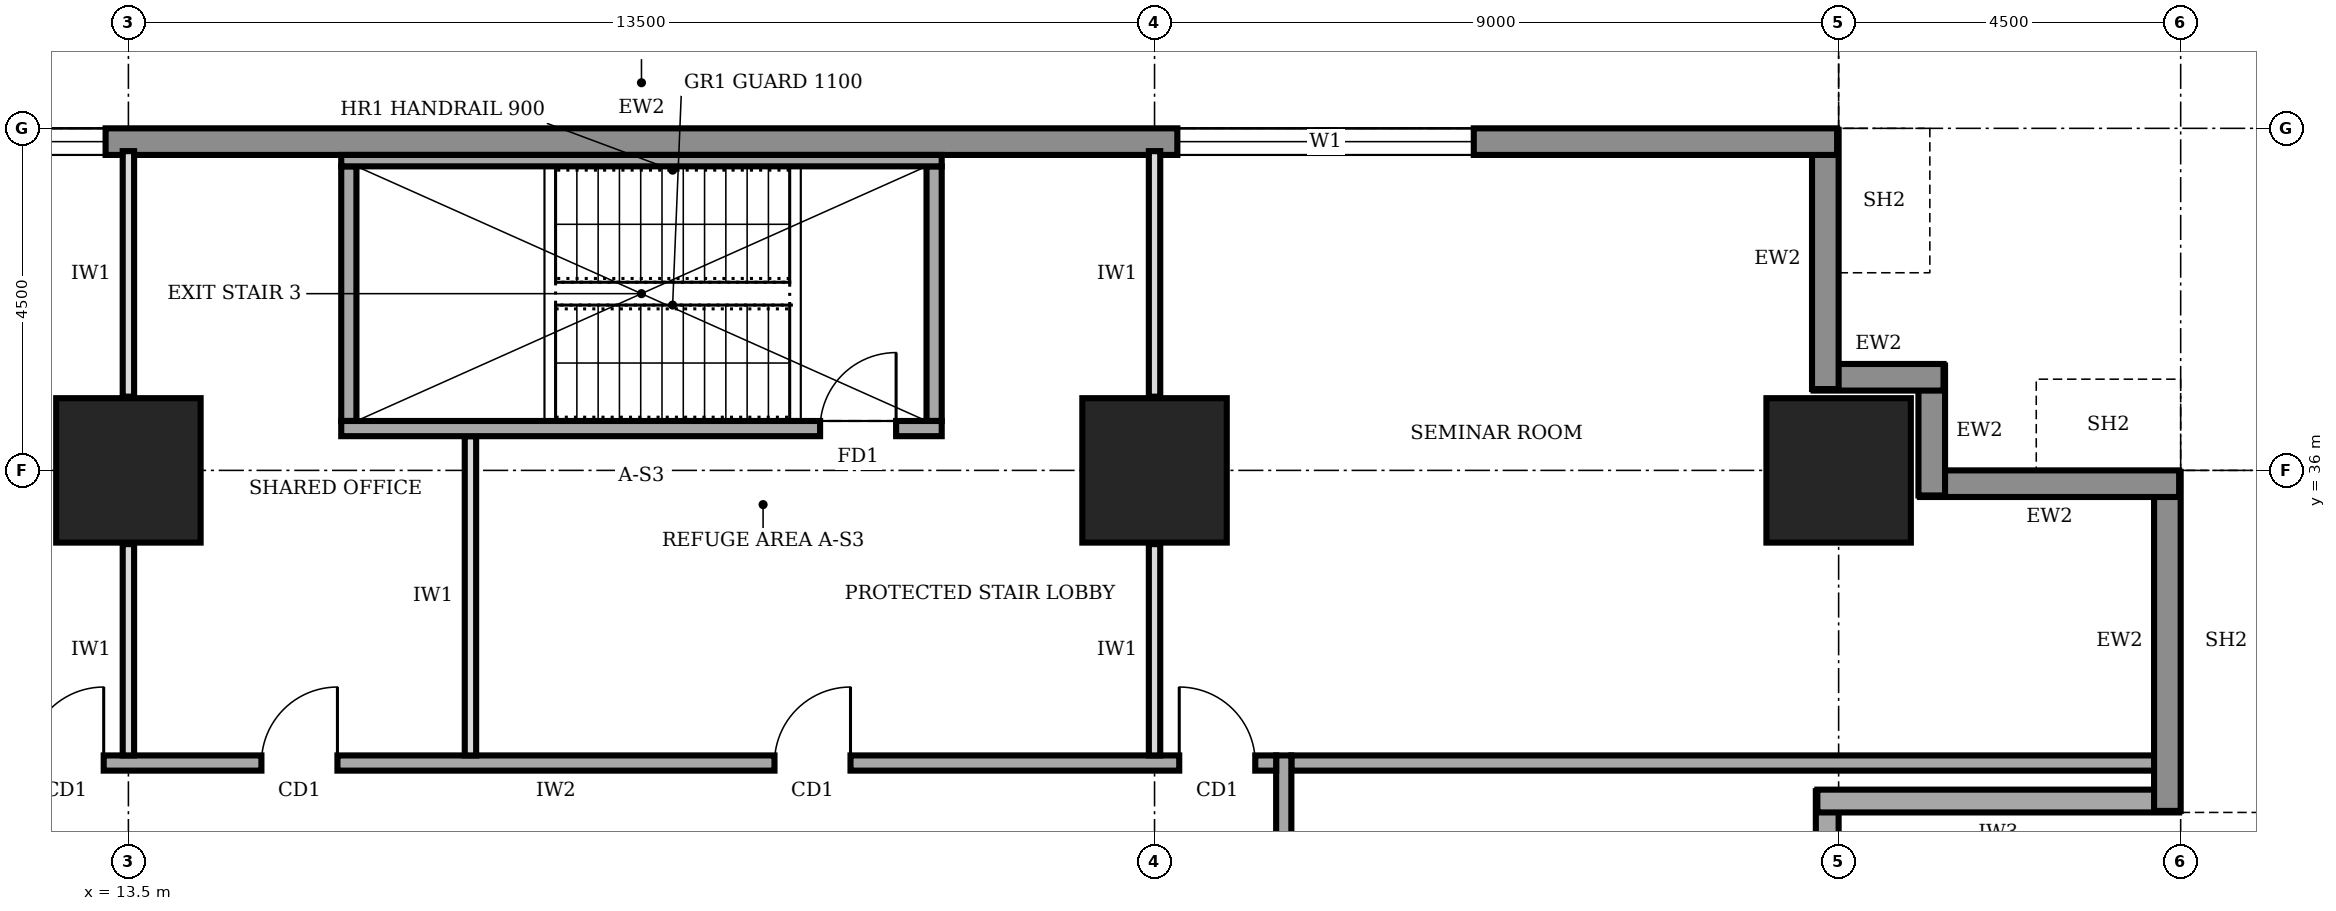
"""IFC4 building model, lengths in metres.
Left out: names, types, materials, properties, quantities, classifications, styles, units other than length and angle.
Written with IfcOpenShell. Run it as: python <this file> out.ifc"""

import sys

from ifc_helpers import new_model, si_unit, direction, frame, frame_2d, origin, origin_2d, place, context, subcontext, project, spatial, rectangle, extrude, element, fill, save


model = new_model("IFC4")
c1 = context("Model", 3, precision=1e-05, world=origin(), true_north=direction((0.0, 1.0)))
c2 = subcontext(c1, "Body", "Model", "MODEL_VIEW")
j1 = project(units=[si_unit("LENGTHUNIT", "METRE"), si_unit("PLANEANGLEUNIT", "RADIAN")], contexts=[c1])
p1 = place(None, origin())
s1 = spatial("IfcSite", under=j1, at=p1, CompositionType="ELEMENT")
p2 = place(p1, origin())
s2 = spatial("IfcBuilding", under=s1, at=p2, CompositionType="ELEMENT")
p3 = place(p2, frame((0.0, 0.0, 105.0)))
s3 = spatial("IfcBuildingStorey", under=s2, at=p3, CompositionType="ELEMENT", Elevation=105.0)
for number, where, z_axis, x_axis in (
    (1, (13.5, 36.0, 0.0), (0.0, 0.0, 1.0), (1.0, 0.0, 0.0)),
    (2, (27.0, 36.0, 0.0), (0.0, 0.0, 1.0), (1.0, 0.0, 0.0)),
    (3, (36.0, 36.0, 0.0), (0.0, 0.0, 1.0), (1.0, 0.0, 0.0)),
):
    element("IfcColumn", number, at=place(p3, frame(where, z_axis=z_axis, x_axis=x_axis)), inside=s3, PredefinedType="COLUMN", context=c2, shape_type="SweptSolid", body=[
        extrude(rectangle(XDim=1.9, YDim=1.9, at=origin_2d()), origin(), (0.0, 0.0, 1.0), 4.0),
    ])
p4 = place(p3, frame((35.85, 30.4, 0.0), z_axis=(0.0, 0.0, 1.0), x_axis=(0.0, 1.0, 0.0)))
e4 = element("IfcWall", 4, at=p4, inside=s3, PredefinedType="SOLIDWALL", context=c2, shape_type="SweptSolid", body=[
    extrude(rectangle(XDim=1.38, YDim=0.3, at=frame_2d((0.69, 0.0))), origin(), (0.0, 0.0, 1.0), 2.65),
])
p5 = place(p3, frame((35.72, 31.65, 0.0), z_axis=(0.0, 0.0, 1.0), x_axis=(1.0, 0.0, 0.0)))
e5 = element("IfcWall", 5, at=p5, inside=s3, PredefinedType="SOLIDWALL", context=c2, shape_type="SweptSolid", body=[
    extrude(rectangle(XDim=4.76, YDim=0.3, at=frame_2d((2.38, 0.0))), origin(), (0.0, 0.0, 1.0), 3.75),
])
p6 = place(p3, frame((40.325, 31.52, 0.0), z_axis=(0.0, 0.0, 1.0), x_axis=(0.0, 1.0, 0.0)))
e6 = element("IfcWall", 6, at=p6, inside=s3, PredefinedType="STANDARD", context=c2, shape_type="SweptSolid", body=[
    extrude(rectangle(XDim=4.46, YDim=0.35, at=frame_2d((2.23, 0.0))), origin(), (0.0, 0.0, 1.0), 3.75),
])
p7 = place(p3, frame((40.48, 35.825, 0.0), z_axis=(0.0, 0.0, 1.0), x_axis=(-1.0, 0.0, 0.0)))
e7 = element("IfcWall", 7, at=p7, inside=s3, PredefinedType="STANDARD", context=c2, shape_type="SweptSolid", body=[
    extrude(rectangle(XDim=3.41, YDim=0.35, at=frame_2d((1.705, 0.0))), origin(), (0.0, 0.0, 1.0), 2.85),
])
for number, where, z_axis, x_axis in (
    (8, (37.225, 35.67, 0.0), (0.0, 0.0, 1.0), (0.0, 1.0, 0.0)),
    (9, (37.38, 37.225, 0.0), (0.0, 0.0, 1.0), (-1.0, 0.0, 0.0)),
):
    element("IfcWall", number, at=place(p3, frame(where, z_axis=z_axis, x_axis=x_axis)), inside=s3, PredefinedType="STANDARD", context=c2, shape_type="SweptSolid", body=[
        extrude(rectangle(XDim=1.71, YDim=0.35, at=frame_2d((0.855, 0.0))), origin(), (0.0, 0.0, 1.0), 3.75),
    ])
p8 = place(p3, frame((35.825, 37.07, 0.0), z_axis=(0.0, 0.0, 1.0), x_axis=(0.0, 1.0, 0.0)))
e10 = element("IfcWall", 10, at=p8, inside=s3, PredefinedType="STANDARD", context=c2, shape_type="SweptSolid", body=[
    extrude(rectangle(XDim=3.41, YDim=0.35, at=frame_2d((1.705, 0.0))), origin(), (0.0, 0.0, 1.0), 2.85),
])
p9 = place(p3, frame((35.98, 40.325, 0.0), z_axis=(0.0, 0.0, 1.0), x_axis=(-1.0, 0.0, 0.0)))
e11 = element("IfcWall", 11, at=p9, inside=s3, PredefinedType="STANDARD", context=c2, shape_type="SweptSolid", body=[
    extrude(rectangle(XDim=31.46, YDim=0.35, at=frame_2d((15.73, 0.0))), origin(), (0.0, 0.0, 1.0), 3.75),
])
p10 = place(p9, frame((27.21, 0.0, 0.9)))
e12 = element("IfcOpeningElement", 12, at=p10, cuts=e11, PredefinedType="OPENING", context=c2, shape_type="SweptSolid", body=[
    extrude(rectangle(XDim=3.9, YDim=2.2, at=frame_2d((1.95, 1.1))), frame((0.0, 0.185, 0.0), z_axis=(0.0, -1.0, 0.0), x_axis=(1.0, 0.0, 0.0)), (0.0, 0.0, 1.0), 0.37),
])
p11 = place(p9, frame((22.78, 0.0, 0.9)))
e13 = element("IfcOpeningElement", 13, at=p11, cuts=e11, PredefinedType="OPENING", context=c2, shape_type="SweptSolid", body=[
    extrude(rectangle(XDim=3.9, YDim=2.2, at=frame_2d((1.95, 1.1))), frame((0.0, 0.185, 0.0), z_axis=(0.0, -1.0, 0.0), x_axis=(1.0, 0.0, 0.0)), (0.0, 0.0, 1.0), 0.37),
])
p12 = place(p9, frame((4.78, 0.0, 0.9)))
e14 = element("IfcOpeningElement", 14, at=p12, cuts=e11, PredefinedType="OPENING", context=c2, shape_type="SweptSolid", body=[
    extrude(rectangle(XDim=3.9, YDim=2.2, at=frame_2d((1.95, 1.1))), frame((0.0, 0.185, 0.0), z_axis=(0.0, -1.0, 0.0), x_axis=(1.0, 0.0, 0.0)), (0.0, 0.0, 1.0), 0.37),
])
p13 = place(p3, frame((28.7, 8.45, 0.0), z_axis=(0.0, 0.0, 1.0), x_axis=(0.0, 1.0, 0.0)))
e15 = element("IfcWall", 15, at=p13, inside=s3, PredefinedType="SOLIDWALL", context=c2, shape_type="SweptSolid", body=[
    extrude(rectangle(XDim=23.8, YDim=0.2, at=frame_2d((11.9, 0.0))), origin(), (0.0, 0.0, 1.0), 3.75),
])
p14 = place(p13, frame((10.9, 0.0, 0.0)))
e16 = element("IfcOpeningElement", 16, at=p14, cuts=e15, PredefinedType="OPENING", context=c2, shape_type="SweptSolid", body=[
    extrude(rectangle(XDim=1.8, YDim=2.1, at=frame_2d((0.9, 1.05))), frame((0.0, 0.11, 0.0), z_axis=(0.0, -1.0, 0.0), x_axis=(1.0, 0.0, 0.0)), (0.0, 0.0, 1.0), 0.22),
])
p15 = place(p3, frame((28.6, 32.15, 0.0), z_axis=(0.0, 0.0, 1.0), x_axis=(-1.0, 0.0, 0.0)))
e17 = element("IfcWall", 17, at=p15, inside=s3, PredefinedType="SOLIDWALL", context=c2, shape_type="SweptSolid", body=[
    extrude(rectangle(XDim=16.9, YDim=0.2, at=frame_2d((8.45, 0.0))), origin(), (0.0, 0.0, 1.0), 3.75),
])
p16 = place(p15, frame((15.425, 0.0, 0.0)))
e18 = element("IfcOpeningElement", 18, at=p16, cuts=e17, PredefinedType="OPENING", context=c2, shape_type="SweptSolid", body=[
    extrude(rectangle(XDim=1.0, YDim=2.1, at=frame_2d((0.5, 1.05))), frame((0.0, 0.11, 0.0), z_axis=(0.0, -1.0, 0.0), x_axis=(1.0, 0.0, 0.0)), (0.0, 0.0, 1.0), 0.22),
])
p17 = place(p15, frame((12.35, 0.0, 0.0)))
e19 = element("IfcOpeningElement", 19, at=p17, cuts=e17, PredefinedType="OPENING", context=c2, shape_type="SweptSolid", body=[
    extrude(rectangle(XDim=1.0, YDim=2.1, at=frame_2d((0.5, 1.05))), frame((0.0, 0.11, 0.0), z_axis=(0.0, -1.0, 0.0), x_axis=(1.0, 0.0, 0.0)), (0.0, 0.0, 1.0), 0.22),
])
p18 = place(p15, frame((5.6, 0.0, 0.0)))
e20 = element("IfcOpeningElement", 20, at=p18, cuts=e17, PredefinedType="OPENING", context=c2, shape_type="SweptSolid", body=[
    extrude(rectangle(XDim=1.0, YDim=2.1, at=frame_2d((0.5, 1.05))), frame((0.0, 0.11, 0.0), z_axis=(0.0, -1.0, 0.0), x_axis=(1.0, 0.0, 0.0)), (0.0, 0.0, 1.0), 0.22),
])
p19 = place(p15, frame((0.275, 0.0, 0.0)))
e21 = element("IfcOpeningElement", 21, at=p19, cuts=e17, PredefinedType="OPENING", context=c2, shape_type="SweptSolid", body=[
    extrude(rectangle(XDim=1.0, YDim=2.1, at=frame_2d((0.5, 1.05))), frame((0.0, 0.11, 0.0), z_axis=(0.0, -1.0, 0.0), x_axis=(1.0, 0.0, 0.0)), (0.0, 0.0, 1.0), 0.22),
])
p20 = place(p3, frame((28.8, 32.15, 0.0), z_axis=(0.0, 0.0, 1.0), x_axis=(1.0, 0.0, 0.0)))
e22 = element("IfcWall", 22, at=p20, inside=s3, PredefinedType="SOLIDWALL", context=c2, shape_type="SweptSolid", body=[
    extrude(rectangle(XDim=11.4, YDim=0.2, at=frame_2d((5.7, 0.0))), origin(), (0.0, 0.0, 1.0), 3.75),
])
p21 = place(p3, frame((13.5, 32.25, 0.0), z_axis=(0.0, 0.0, 1.0), x_axis=(0.0, 1.0, 0.0)))
e23 = element("IfcWall", 23, at=p21, inside=s3, PredefinedType="PARTITIONING", context=c2, shape_type="SweptSolid", body=[
    extrude(rectangle(XDim=2.78, YDim=0.15, at=frame_2d((1.39, 0.0))), origin(), (0.0, 0.0, 1.0), 2.85),
])
p22 = place(p3, frame((13.5, 36.97, 0.0), z_axis=(0.0, 0.0, 1.0), x_axis=(0.0, 1.0, 0.0)))
e24 = element("IfcWall", 24, at=p22, inside=s3, PredefinedType="PARTITIONING", context=c2, shape_type="SweptSolid", body=[
    extrude(rectangle(XDim=3.23, YDim=0.15, at=frame_2d((1.615, 0.0))), origin(), (0.0, 0.0, 1.0), 2.85),
])
p23 = place(p3, frame((18.0, 32.25, 0.0), z_axis=(0.0, 0.0, 1.0), x_axis=(0.0, 1.0, 0.0)))
e25 = element("IfcWall", 25, at=p23, inside=s3, PredefinedType="PARTITIONING", context=c2, shape_type="SweptSolid", body=[
    extrude(rectangle(XDim=4.2, YDim=0.15, at=frame_2d((2.1, 0.0))), origin(), (0.0, 0.0, 1.0), 3.75),
])
p24 = place(p3, frame((27.0, 32.25, 0.0), z_axis=(0.0, 0.0, 1.0), x_axis=(0.0, 1.0, 0.0)))
e26 = element("IfcWall", 26, at=p24, inside=s3, PredefinedType="PARTITIONING", context=c2, shape_type="SweptSolid", body=[
    extrude(rectangle(XDim=2.78, YDim=0.15, at=frame_2d((1.39, 0.0))), origin(), (0.0, 0.0, 1.0), 2.85),
])
p25 = place(p3, frame((27.0, 36.97, 0.0), z_axis=(0.0, 0.0, 1.0), x_axis=(0.0, 1.0, 0.0)))
e27 = element("IfcWall", 27, at=p25, inside=s3, PredefinedType="PARTITIONING", context=c2, shape_type="SweptSolid", body=[
    extrude(rectangle(XDim=3.23, YDim=0.15, at=frame_2d((1.615, 0.0))), origin(), (0.0, 0.0, 1.0), 2.85),
])
p26 = place(p3, frame((16.3, 36.55, 0.0), z_axis=(0.0, 0.0, 1.0), x_axis=(1.0, 0.0, 0.0)))
e28 = element("IfcWall", 28, at=p26, inside=s3, PredefinedType="SOLIDWALL", context=c2, shape_type="SweptSolid", body=[
    extrude(rectangle(XDim=7.9, YDim=0.2, at=frame_2d((3.95, 0.0))), origin(), (0.0, 0.0, 1.0), 3.75),
])
p27 = place(p26, frame((6.3, 0.0, 0.0)))
e29 = element("IfcOpeningElement", 29, at=p27, cuts=e28, PredefinedType="OPENING", context=c2, shape_type="SweptSolid", body=[
    extrude(rectangle(XDim=1.0, YDim=2.1, at=frame_2d((0.5, 1.05))), frame((0.0, 0.11, 0.0), z_axis=(0.0, -1.0, 0.0), x_axis=(1.0, 0.0, 0.0)), (0.0, 0.0, 1.0), 0.22),
])
p28 = place(p3, frame((16.3, 40.075, 0.0), z_axis=(0.0, 0.0, 1.0), x_axis=(1.0, 0.0, 0.0)))
e30 = element("IfcWall", 30, at=p28, inside=s3, PredefinedType="SOLIDWALL", context=c2, shape_type="SweptSolid", body=[
    extrude(rectangle(XDim=7.9, YDim=0.15, at=frame_2d((3.95, 0.0))), origin(), (0.0, 0.0, 1.0), 3.75),
])
for number, where, z_axis, x_axis in (
    (31, (16.4, 36.65, 0.0), (0.0, 0.0, 1.0), (0.0, 1.0, 0.0)),
    (32, (24.1, 36.65, 0.0), (0.0, 0.0, 1.0), (0.0, 1.0, 0.0)),
):
    element("IfcWall", number, at=place(p3, frame(where, z_axis=z_axis, x_axis=x_axis)), inside=s3, PredefinedType="SOLIDWALL", context=c2, shape_type="SweptSolid", body=[
        extrude(rectangle(XDim=3.35, YDim=0.2, at=frame_2d((1.675, 0.0))), origin(), (0.0, 0.0, 1.0), 3.75),
    ])
p29 = place(p11, origin())
e33 = element("IfcWindow", 33, at=p29, inside=s3, PartitioningType="SINGLE_PANEL", PredefinedType="WINDOW", context=c2, shape_type="SweptSolid", body=[
    extrude(rectangle(XDim=3.9, YDim=2.2, at=frame_2d((1.95, 1.1))), frame((0.0, 0.03, 0.0), z_axis=(0.0, -1.0, 0.0), x_axis=(1.0, 0.0, 0.0)), (0.0, 0.0, 1.0), 0.06),
])
fill(e13, e33)
p30 = place(p12, origin())
e34 = element("IfcWindow", 34, at=p30, inside=s3, PartitioningType="SINGLE_PANEL", PredefinedType="WINDOW", context=c2, shape_type="SweptSolid", body=[
    extrude(rectangle(XDim=3.9, YDim=2.2, at=frame_2d((1.95, 1.1))), frame((0.0, 0.03, 0.0), z_axis=(0.0, -1.0, 0.0), x_axis=(1.0, 0.0, 0.0)), (0.0, 0.0, 1.0), 0.06),
])
fill(e14, e34)
p31 = place(p16, frame((1.0, 0.0, 0.0), z_axis=(0.0, 0.0, 1.0), x_axis=(-1.0, 0.0, 0.0)))
e35 = element("IfcDoor", 35, at=p31, inside=s3, OperationType="SINGLE_SWING_RIGHT", PredefinedType="DOOR", context=c2, shape_type="SweptSolid", body=[
    extrude(rectangle(XDim=1.0, YDim=2.1, at=frame_2d((0.5, 1.05))), frame((0.0, 0.025, 0.0), z_axis=(0.0, -1.0, 0.0), x_axis=(1.0, 0.0, 0.0)), (0.0, 0.0, 1.0), 0.05),
])
fill(e18, e35)
p32 = place(p17, frame((1.0, 0.0, 0.0), z_axis=(0.0, 0.0, 1.0), x_axis=(-1.0, 0.0, 0.0)))
e36 = element("IfcDoor", 36, at=p32, inside=s3, OperationType="SINGLE_SWING_RIGHT", PredefinedType="DOOR", context=c2, shape_type="SweptSolid", body=[
    extrude(rectangle(XDim=1.0, YDim=2.1, at=frame_2d((0.5, 1.05))), frame((0.0, 0.025, 0.0), z_axis=(0.0, -1.0, 0.0), x_axis=(1.0, 0.0, 0.0)), (0.0, 0.0, 1.0), 0.05),
])
fill(e19, e36)
p33 = place(p18, frame((1.0, 0.0, 0.0), z_axis=(0.0, 0.0, 1.0), x_axis=(-1.0, 0.0, 0.0)))
e37 = element("IfcDoor", 37, at=p33, inside=s3, OperationType="SINGLE_SWING_RIGHT", PredefinedType="DOOR", context=c2, shape_type="SweptSolid", body=[
    extrude(rectangle(XDim=1.0, YDim=2.1, at=frame_2d((0.5, 1.05))), frame((0.0, 0.025, 0.0), z_axis=(0.0, -1.0, 0.0), x_axis=(1.0, 0.0, 0.0)), (0.0, 0.0, 1.0), 0.05),
])
fill(e20, e37)
p34 = place(p19, frame((1.0, 0.0, 0.0), z_axis=(0.0, 0.0, 1.0), x_axis=(-1.0, 0.0, 0.0)))
e38 = element("IfcDoor", 38, at=p34, inside=s3, OperationType="SINGLE_SWING_LEFT", PredefinedType="DOOR", context=c2, shape_type="SweptSolid", body=[
    extrude(rectangle(XDim=1.0, YDim=2.1, at=frame_2d((0.5, 1.05))), frame((0.0, 0.025, 0.0), z_axis=(0.0, -1.0, 0.0), x_axis=(1.0, 0.0, 0.0)), (0.0, 0.0, 1.0), 0.05),
])
fill(e21, e38)
p35 = place(p27, origin())
e39 = element("IfcDoor", 39, at=p35, inside=s3, OperationType="SINGLE_SWING_RIGHT", PredefinedType="DOOR", context=c2, shape_type="SweptSolid", body=[
    extrude(rectangle(XDim=1.0, YDim=2.1, at=frame_2d((0.5, 1.05))), frame((0.0, 0.025, 0.0), z_axis=(0.0, -1.0, 0.0), x_axis=(1.0, 0.0, 0.0)), (0.0, 0.0, 1.0), 0.05),
])
fill(e29, e39)
save(model, sys.argv[1])
